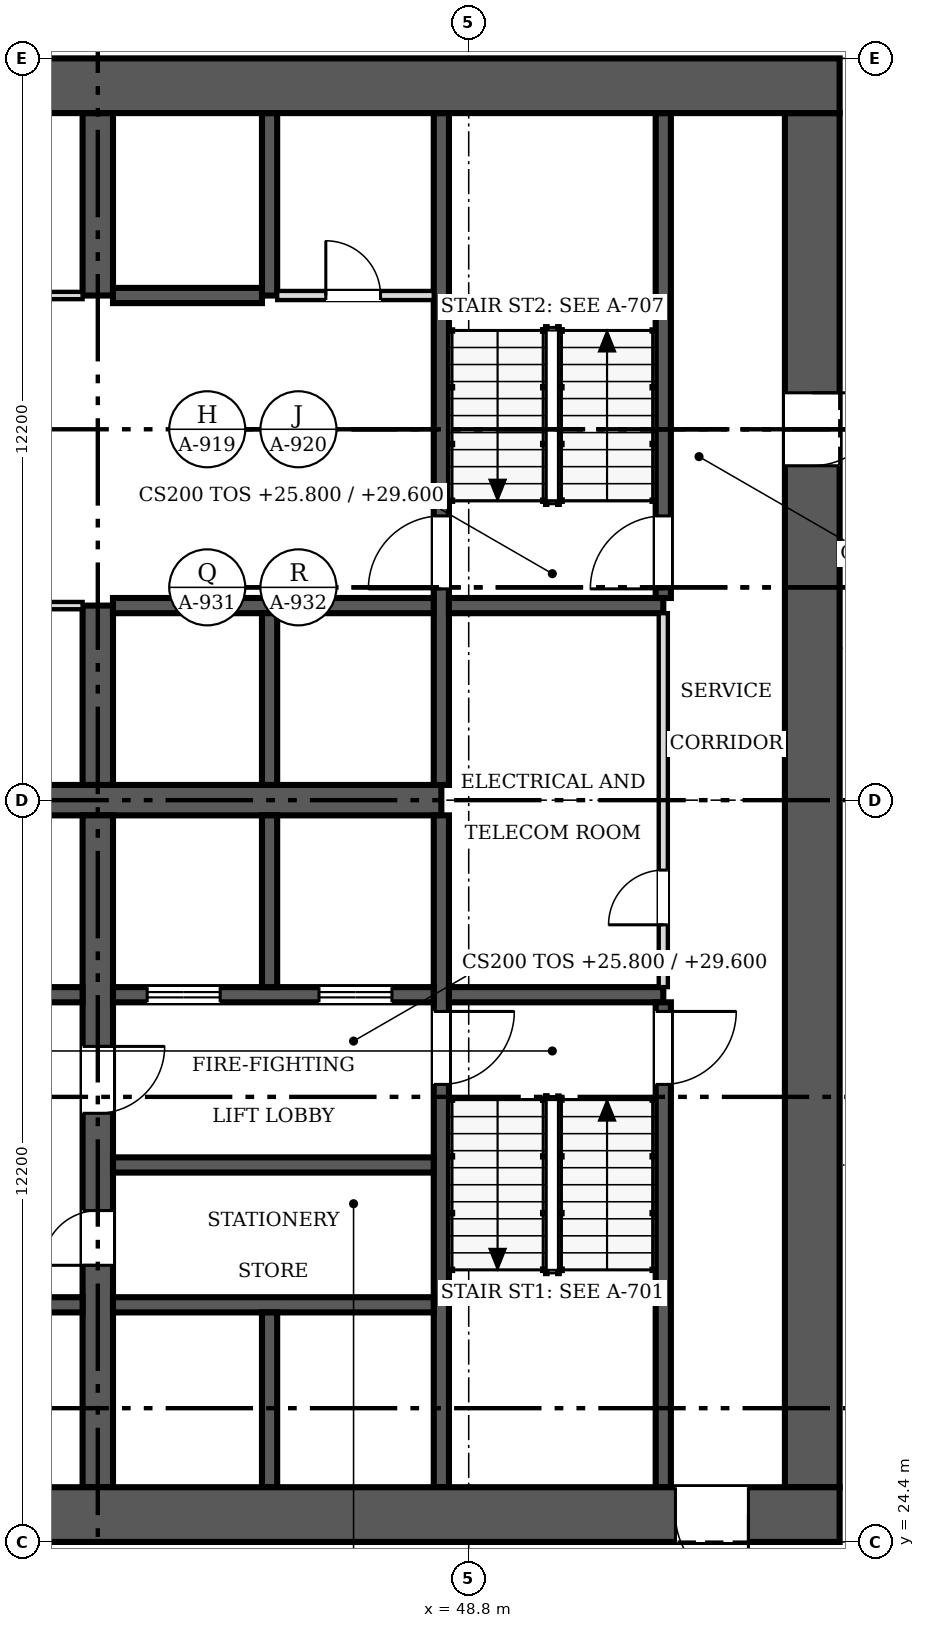
"""IFC4 building model, lengths in metres.
Left out: names, types, materials, properties, quantities, classifications, styles, units other than length and angle.
Written with IfcOpenShell. Run it as: python <this file> out.ifc"""

import sys

from ifc_helpers import new_model, si_unit, direction, frame, frame_2d, origin, place, context, subcontext, project, spatial, rectangle, extrude, source, transform, mapped, element, fill, save


model = new_model("IFC4")
c1 = context("Model", 3, precision=1e-05, world=origin(), true_north=direction((0.0, 1.0)))
c2 = subcontext(c1, "Body", "Model", "MODEL_VIEW")
j1 = project(units=[si_unit("LENGTHUNIT", "METRE"), si_unit("PLANEANGLEUNIT", "RADIAN")], contexts=[c1])
p1 = place(None, origin())
s1 = spatial("IfcSite", under=j1, at=p1, CompositionType="ELEMENT")
p2 = place(p1, origin())
s2 = spatial("IfcBuilding", under=s1, at=p2, CompositionType="ELEMENT")
p3 = place(p2, frame((0.0, 0.0, 25.8)))
s3 = spatial("IfcBuildingStorey", under=s2, at=p3, CompositionType="ELEMENT", Elevation=25.8)
p4 = place(p3, frame((54.9, 24.85, 0.0), z_axis=(0.0, 0.0, 1.0), x_axis=(-1.0, 0.0, 0.0)))
e1 = element("IfcWall", 1, at=p4, inside=s3, PredefinedType="SHEAR", context=c2, shape_type="SweptSolid", body=[
    extrude(rectangle(XDim=24.4, YDim=0.9, at=frame_2d((12.2, 0.0))), origin(), (0.0, 0.0, 1.0), 3.8),
])
m1 = source(origin(), c2, "Body", "SweptSolid", [
    extrude(rectangle(XDim=1.2, YDim=2.1, at=frame_2d((0.6, 1.05))), frame((0.0, 0.46, 0.0), z_axis=(0.0, -1.0, 0.0), x_axis=(1.0, 0.0, 0.0)), (0.0, 0.0, 1.0), 0.92),
])
p5 = place(p4, frame((1.5, 0.0, 0.0)))
e2 = element("IfcOpeningElement", 2, at=p5, cuts=e1, PredefinedType="OPENING", context=c2, shape_type="MappedRepresentation", body=[
    mapped(m1, transform((0.0, 0.0, 0.0), scale=1.0)),
])
p6 = place(p3, frame((30.5, 48.35, 0.0), z_axis=(0.0, 0.0, 1.0), x_axis=(1.0, 0.0, 0.0)))
e3 = element("IfcWall", 3, at=p6, inside=s3, PredefinedType="SHEAR", context=c2, shape_type="SweptSolid", body=[
    extrude(rectangle(XDim=24.4, YDim=0.9, at=frame_2d((12.2, 0.0))), origin(), (0.0, 0.0, 1.0), 3.8),
])
p7 = place(p3, frame((54.45, 47.9, 0.0), z_axis=(0.0, 0.0, 1.0), x_axis=(0.0, -1.0, 0.0)))
e4 = element("IfcWall", 4, at=p7, inside=s3, PredefinedType="SHEAR", context=c2, shape_type="SweptSolid", body=[
    extrude(rectangle(XDim=22.6, YDim=0.9, at=frame_2d((11.3, 0.0))), origin(), (0.0, 0.0, 1.0), 3.8),
])
p8 = place(p7, frame((4.6, 0.0, 0.0)))
e5 = element("IfcOpeningElement", 5, at=p8, cuts=e4, PredefinedType="OPENING", context=c2, shape_type="MappedRepresentation", body=[
    mapped(m1, transform((0.0, 0.0, 0.0), scale=1.0)),
])
p9 = place(p3, frame((31.4, 36.6, 0.0), z_axis=(0.0, 0.0, 1.0), x_axis=(1.0, 0.0, 0.0)))
e6 = element("IfcWall", 6, at=p9, inside=s3, PredefinedType="SHEAR", context=c2, shape_type="SweptSolid", body=[
    extrude(rectangle(XDim=16.95, YDim=0.5, at=frame_2d((8.475, 0.0))), origin(), (0.0, 0.0, 1.0), 3.8),
])
p10 = place(p3, frame((42.7, 36.35, 0.0), z_axis=(0.0, 0.0, 1.0), x_axis=(0.0, -1.0, 0.0)))
e7 = element("IfcWall", 7, at=p10, inside=s3, PredefinedType="SHEAR", context=c2, shape_type="SweptSolid", body=[
    extrude(rectangle(XDim=11.05, YDim=0.5, at=frame_2d((5.525, 0.0))), origin(), (0.0, 0.0, 1.0), 3.8),
])
m2 = source(origin(), c2, "Body", "SweptSolid", [
    extrude(rectangle(XDim=0.9, YDim=2.1, at=frame_2d((0.45, 1.05))), frame((0.0, 0.26, 0.0), z_axis=(0.0, -1.0, 0.0), x_axis=(1.0, 0.0, 0.0)), (0.0, 0.0, 1.0), 0.52),
])
p11 = place(p10, frame((6.5, 0.0, 0.0)))
e8 = element("IfcOpeningElement", 8, at=p11, cuts=e7, PredefinedType="OPENING", context=c2, shape_type="MappedRepresentation", body=[
    mapped(m2, transform((0.0, 0.0, 0.0), scale=1.0)),
])
m3 = source(origin(), c2, "Body", "SweptSolid", [
    extrude(rectangle(XDim=1.1, YDim=2.1, at=frame_2d((0.55, 1.05))), frame((0.0, 0.26, 0.0), z_axis=(0.0, -1.0, 0.0), x_axis=(1.0, 0.0, 0.0)), (0.0, 0.0, 1.0), 0.52),
])
p12 = place(p10, frame((3.8, 0.0, 0.0)))
e9 = element("IfcOpeningElement", 9, at=p12, cuts=e7, PredefinedType="OPENING", context=c2, shape_type="MappedRepresentation", body=[
    mapped(m3, transform((0.0, 0.0, 0.0), scale=1.0)),
])
p13 = place(p3, frame((42.7, 36.85, 0.0), z_axis=(0.0, 0.0, 1.0), x_axis=(0.0, 1.0, 0.0)))
e10 = element("IfcWall", 10, at=p13, inside=s3, PredefinedType="SHEAR", context=c2, shape_type="SweptSolid", body=[
    extrude(rectangle(XDim=2.95, YDim=0.5, at=frame_2d((1.475, 0.0))), origin(), (0.0, 0.0, 1.0), 3.8),
])
p14 = place(p3, frame((42.7, 44.9, 0.0), z_axis=(0.0, 0.0, 1.0), x_axis=(0.0, 1.0, 0.0)))
e11 = element("IfcWall", 11, at=p14, inside=s3, PredefinedType="SHEAR", context=c2, shape_type="SweptSolid", body=[
    extrude(rectangle(XDim=3.0, YDim=0.5, at=frame_2d((1.5, 0.0))), origin(), (0.0, 0.0, 1.0), 3.8),
])
p15 = place(p3, frame((48.35, 36.35, 0.0), z_axis=(0.0, 0.0, 1.0), x_axis=(0.0, -1.0, 0.0)))
e12 = element("IfcWall", 12, at=p15, inside=s3, PredefinedType="SOLIDWALL", context=c2, shape_type="SweptSolid", body=[
    extrude(rectangle(XDim=11.05, YDim=0.25, at=frame_2d((5.525, 0.0))), origin(), (0.0, 0.0, 1.0), 3.8),
])
m4 = source(origin(), c2, "Body", "SweptSolid", [
    extrude(rectangle(XDim=1.2, YDim=2.1, at=frame_2d((0.6, 1.05))), frame((0.0, 0.135, 0.0), z_axis=(0.0, -1.0, 0.0), x_axis=(1.0, 0.0, 0.0)), (0.0, 0.0, 1.0), 0.27),
])
p16 = place(p15, frame((3.225, 0.0, 0.0)))
e13 = element("IfcOpeningElement", 13, at=p16, cuts=e12, PredefinedType="OPENING", context=c2, shape_type="MappedRepresentation", body=[
    mapped(m4, transform((0.0, 0.0, 0.0), scale=1.0)),
])
p17 = place(p3, frame((48.35, 47.9, 0.0), z_axis=(0.0, 0.0, 1.0), x_axis=(0.0, -1.0, 0.0)))
e14 = element("IfcWall", 14, at=p17, inside=s3, PredefinedType="SOLIDWALL", context=c2, shape_type="SweptSolid", body=[
    extrude(rectangle(XDim=11.05, YDim=0.25, at=frame_2d((5.525, 0.0))), origin(), (0.0, 0.0, 1.0), 3.8),
])
p18 = place(p17, frame((6.625, 0.0, 0.0)))
e15 = element("IfcOpeningElement", 15, at=p18, cuts=e14, PredefinedType="OPENING", context=c2, shape_type="MappedRepresentation", body=[
    mapped(m4, transform((0.0, 0.0, 0.0), scale=1.0)),
])
p19 = place(p3, frame((42.45, 33.4, 0.0), z_axis=(0.0, 0.0, 1.0), x_axis=(-1.0, 0.0, 0.0)))
e16 = element("IfcWall", 16, at=p19, inside=s3, PredefinedType="SOLIDWALL", context=c2, shape_type="SweptSolid", body=[
    extrude(rectangle(XDim=11.05, YDim=0.25, at=frame_2d((5.525, 0.0))), origin(), (0.0, 0.0, 1.0), 3.8),
])
m5 = source(origin(), c2, "Body", "SweptSolid", [
    extrude(rectangle(XDim=1.1, YDim=2.1, at=frame_2d((0.55, 1.05))), frame((0.0, 0.135, 0.0), z_axis=(0.0, -1.0, 0.0), x_axis=(1.0, 0.0, 0.0)), (0.0, 0.0, 1.0), 0.27),
])
p20 = place(p19, frame((9.087, 0.0, 0.0)))
e17 = element("IfcOpeningElement", 17, at=p20, cuts=e16, PredefinedType="OPENING", context=c2, shape_type="MappedRepresentation", body=[
    mapped(m5, transform((0.0, 0.0, 0.0), scale=1.0)),
])
p21 = place(p19, frame((6.262, 0.0, 0.0)))
e18 = element("IfcOpeningElement", 18, at=p21, cuts=e16, PredefinedType="OPENING", context=c2, shape_type="MappedRepresentation", body=[
    mapped(m5, transform((0.0, 0.0, 0.0), scale=1.0)),
])
p22 = place(p19, frame((3.438, 0.0, 0.0)))
e19 = element("IfcOpeningElement", 19, at=p22, cuts=e16, PredefinedType="OPENING", context=c2, shape_type="MappedRepresentation", body=[
    mapped(m5, transform((0.0, 0.0, 0.0), scale=1.0)),
])
p23 = place(p19, frame((0.613, 0.0, 0.0)))
e20 = element("IfcOpeningElement", 20, at=p23, cuts=e16, PredefinedType="OPENING", context=c2, shape_type="MappedRepresentation", body=[
    mapped(m5, transform((0.0, 0.0, 0.0), scale=1.0)),
])
p24 = place(p3, frame((48.225, 33.4, 0.0), z_axis=(0.0, 0.0, 1.0), x_axis=(-1.0, 0.0, 0.0)))
e21 = element("IfcWall", 21, at=p24, inside=s3, PredefinedType="SOLIDWALL", context=c2, shape_type="SweptSolid", body=[
    extrude(rectangle(XDim=5.275, YDim=0.25, at=frame_2d((2.638, 0.0))), origin(), (0.0, 0.0, 1.0), 3.8),
])
p25 = place(p24, frame((3.512, 0.0, 0.0)))
e22 = element("IfcOpeningElement", 22, at=p25, cuts=e21, PredefinedType="OPENING", context=c2, shape_type="MappedRepresentation", body=[
    mapped(m4, transform((0.0, 0.0, 0.0), scale=1.0)),
])
p26 = place(p24, frame((0.688, 0.0, 0.0)))
e23 = element("IfcOpeningElement", 23, at=p26, cuts=e21, PredefinedType="OPENING", context=c2, shape_type="MappedRepresentation", body=[
    mapped(m4, transform((0.0, 0.0, 0.0), scale=1.0)),
])
p27 = place(p3, frame((48.475, 33.4, 0.0), z_axis=(0.0, 0.0, 1.0), x_axis=(1.0, 0.0, 0.0)))
e24 = element("IfcWall", 24, at=p27, inside=s3, PredefinedType="SOLIDWALL", context=c2, shape_type="SweptSolid", body=[
    extrude(rectangle(XDim=3.525, YDim=0.25, at=frame_2d((1.762, 0.0))), origin(), (0.0, 0.0, 1.0), 3.8),
])
p28 = place(p3, frame((31.4, 28.3, 0.0), z_axis=(0.0, 0.0, 1.0), x_axis=(1.0, 0.0, 0.0)))
e25 = element("IfcWall", 25, at=p28, inside=s3, PredefinedType="SOLIDWALL", context=c2, shape_type="SweptSolid", body=[
    extrude(rectangle(XDim=11.05, YDim=0.25, at=frame_2d((5.525, 0.0))), origin(), (0.0, 0.0, 1.0), 3.8),
])
p29 = place(p28, frame((0.863, 0.0, 0.0)))
e26 = element("IfcOpeningElement", 26, at=p29, cuts=e25, PredefinedType="OPENING", context=c2, shape_type="MappedRepresentation", body=[
    mapped(m5, transform((0.0, 0.0, 0.0), scale=1.0)),
])
p30 = place(p28, frame((3.688, 0.0, 0.0)))
e27 = element("IfcOpeningElement", 27, at=p30, cuts=e25, PredefinedType="OPENING", context=c2, shape_type="MappedRepresentation", body=[
    mapped(m5, transform((0.0, 0.0, 0.0), scale=1.0)),
])
p31 = place(p28, frame((6.512, 0.0, 0.0)))
e28 = element("IfcOpeningElement", 28, at=p31, cuts=e25, PredefinedType="OPENING", context=c2, shape_type="MappedRepresentation", body=[
    mapped(m5, transform((0.0, 0.0, 0.0), scale=1.0)),
])
p32 = place(p28, frame((9.337, 0.0, 0.0)))
e29 = element("IfcOpeningElement", 29, at=p32, cuts=e25, PredefinedType="OPENING", context=c2, shape_type="MappedRepresentation", body=[
    mapped(m5, transform((0.0, 0.0, 0.0), scale=1.0)),
])
for number, where, z_axis, x_axis in (
    (30, (42.95, 28.3, 0.0), (0.0, 0.0, 1.0), (1.0, 0.0, 0.0)),
    (31, (42.95, 39.8, 0.0), (0.0, 0.0, 1.0), (1.0, 0.0, 0.0)),
):
    element("IfcWall", number, at=place(p3, frame(where, z_axis=z_axis, x_axis=x_axis)), inside=s3, PredefinedType="SOLIDWALL", context=c2, shape_type="SweptSolid", body=[
        extrude(rectangle(XDim=5.275, YDim=0.25, at=frame_2d((2.638, 0.0))), origin(), (0.0, 0.0, 1.0), 3.8),
    ])
p33 = place(p3, frame((48.475, 39.8, 0.0), z_axis=(0.0, 0.0, 1.0), x_axis=(1.0, 0.0, 0.0)))
e32 = element("IfcWall", 32, at=p33, inside=s3, PredefinedType="SOLIDWALL", context=c2, shape_type="SweptSolid", body=[
    extrude(rectangle(XDim=3.525, YDim=0.25, at=frame_2d((1.762, 0.0))), origin(), (0.0, 0.0, 1.0), 3.8),
])
p34 = place(p3, frame((52.0, 25.3, 0.0), z_axis=(0.0, 0.0, 1.0), x_axis=(0.0, 1.0, 0.0)))
e33 = element("IfcWall", 33, at=p34, inside=s3, PredefinedType="SOLIDWALL", context=c2, shape_type="SweptSolid", body=[
    extrude(rectangle(XDim=7.975, YDim=0.25, at=frame_2d((3.987, 0.0))), origin(), (0.0, 0.0, 1.0), 3.8),
])
p35 = place(p34, frame((6.625, 0.0, 0.0)))
e34 = element("IfcOpeningElement", 34, at=p35, cuts=e33, PredefinedType="OPENING", context=c2, shape_type="MappedRepresentation", body=[
    mapped(m4, transform((0.0, 0.0, 0.0), scale=1.0)),
])
p36 = place(p3, frame((52.0, 39.925, 0.0), z_axis=(0.0, 0.0, 1.0), x_axis=(0.0, 1.0, 0.0)))
e35 = element("IfcWall", 35, at=p36, inside=s3, PredefinedType="SOLIDWALL", context=c2, shape_type="SweptSolid", body=[
    extrude(rectangle(XDim=7.975, YDim=0.25, at=frame_2d((3.987, 0.0))), origin(), (0.0, 0.0, 1.0), 3.8),
])
p37 = place(p36, frame((0.15, 0.0, 0.0)))
e36 = element("IfcOpeningElement", 36, at=p37, cuts=e35, PredefinedType="OPENING", context=c2, shape_type="MappedRepresentation", body=[
    mapped(m4, transform((0.0, 0.0, 0.0), scale=1.0)),
])
p38 = place(p3, frame((45.525, 33.525, 0.0), z_axis=(0.0, 0.0, 1.0), x_axis=(0.0, 1.0, 0.0)))
e37 = element("IfcWall", 37, at=p38, inside=s3, PredefinedType="SOLIDWALL", context=c2, shape_type="SweptSolid", body=[
    extrude(rectangle(XDim=2.825, YDim=0.25, at=frame_2d((1.413, 0.0))), origin(), (0.0, 0.0, 1.0), 3.8),
])
p39 = place(p3, frame((45.525, 36.85, 0.0), z_axis=(0.0, 0.0, 1.0), x_axis=(0.0, 1.0, 0.0)))
e38 = element("IfcWall", 38, at=p39, inside=s3, PredefinedType="SOLIDWALL", context=c2, shape_type="SweptSolid", body=[
    extrude(rectangle(XDim=2.825, YDim=0.25, at=frame_2d((1.413, 0.0))), origin(), (0.0, 0.0, 1.0), 3.8),
])
p40 = place(p3, frame((42.95, 30.6, 0.0), z_axis=(0.0, 0.0, 1.0), x_axis=(1.0, 0.0, 0.0)))
e39 = element("IfcWall", 39, at=p40, inside=s3, PredefinedType="SOLIDWALL", context=c2, shape_type="SweptSolid", body=[
    extrude(rectangle(XDim=5.275, YDim=0.25, at=frame_2d((2.638, 0.0))), origin(), (0.0, 0.0, 1.0), 3.8),
])
p41 = place(p3, frame((45.525, 25.3, 0.0), z_axis=(0.0, 0.0, 1.0), x_axis=(0.0, 1.0, 0.0)))
e40 = element("IfcWall", 40, at=p41, inside=s3, PredefinedType="SOLIDWALL", context=c2, shape_type="SweptSolid", body=[
    extrude(rectangle(XDim=2.875, YDim=0.25, at=frame_2d((1.438, 0.0))), origin(), (0.0, 0.0, 1.0), 3.8),
])
p42 = place(p3, frame((45.525, 44.9, 0.0), z_axis=(0.0, 0.0, 1.0), x_axis=(0.0, 1.0, 0.0)))
e41 = element("IfcWall", 41, at=p42, inside=s3, PredefinedType="SOLIDWALL", context=c2, shape_type="SweptSolid", body=[
    extrude(rectangle(XDim=3.0, YDim=0.25, at=frame_2d((1.5, 0.0))), origin(), (0.0, 0.0, 1.0), 3.8),
])
p43 = place(p3, frame((42.95, 44.9, 0.0), z_axis=(0.0, 0.0, 1.0), x_axis=(1.0, 0.0, 0.0)))
e42 = element("IfcWall", 42, at=p43, inside=s3, PredefinedType="SOLIDWALL", context=c2, shape_type="SweptSolid", body=[
    extrude(rectangle(XDim=2.45, YDim=0.25, at=frame_2d((1.225, 0.0))), origin(), (0.0, 0.0, 1.0), 3.8),
])
p44 = place(p3, frame((31.4, 44.9, 0.0), z_axis=(0.0, 0.0, 1.0), x_axis=(1.0, 0.0, 0.0)))
e43 = element("IfcWall", 43, at=p44, inside=s3, PredefinedType="PARTITIONING", context=c2, shape_type="SweptSolid", body=[
    extrude(rectangle(XDim=11.05, YDim=0.12, at=frame_2d((5.525, 0.0))), origin(), (0.0, 0.0, 1.0), 3.6),
])
m6 = source(origin(), c2, "Body", "SweptSolid", [
    extrude(rectangle(XDim=0.9, YDim=2.1, at=frame_2d((0.45, 1.05))), frame((0.0, 0.07, 0.0), z_axis=(0.0, -1.0, 0.0), x_axis=(1.0, 0.0, 0.0)), (0.0, 0.0, 1.0), 0.14),
])
p45 = place(p44, frame((3.788, 0.0, 0.0)))
e44 = element("IfcOpeningElement", 44, at=p45, cuts=e43, PredefinedType="OPENING", context=c2, shape_type="MappedRepresentation", body=[
    mapped(m6, transform((0.0, 0.0, 0.0), scale=1.0)),
])
p46 = place(p44, frame((9.438, 0.0, 0.0)))
e45 = element("IfcOpeningElement", 45, at=p46, cuts=e43, PredefinedType="OPENING", context=c2, shape_type="MappedRepresentation", body=[
    mapped(m6, transform((0.0, 0.0, 0.0), scale=1.0)),
])
p47 = place(p3, frame((42.45, 39.8, 0.0), z_axis=(0.0, 0.0, 1.0), x_axis=(-1.0, 0.0, 0.0)))
e46 = element("IfcWall", 46, at=p47, inside=s3, PredefinedType="PARTITIONING", context=c2, shape_type="SweptSolid", body=[
    extrude(rectangle(XDim=8.225, YDim=0.12, at=frame_2d((4.112, 0.0))), origin(), (0.0, 0.0, 1.0), 3.6),
])
p48 = place(p47, frame((3.538, 0.0, 0.0)))
e47 = element("IfcOpeningElement", 47, at=p48, cuts=e46, PredefinedType="OPENING", context=c2, shape_type="MappedRepresentation", body=[
    mapped(m6, transform((0.0, 0.0, 0.0), scale=1.0)),
])
p49 = place(p3, frame((52.0, 33.525, 0.0), z_axis=(0.0, 0.0, 1.0), x_axis=(0.0, 1.0, 0.0)))
e48 = element("IfcWall", 48, at=p49, inside=s3, PredefinedType="PARTITIONING", context=c2, shape_type="SweptSolid", body=[
    extrude(rectangle(XDim=6.15, YDim=0.15, at=frame_2d((3.075, 0.0))), origin(), (0.0, 0.0, 1.0), 3.6),
])
m7 = source(origin(), c2, "Body", "SweptSolid", [
    extrude(rectangle(XDim=0.9, YDim=2.1, at=frame_2d((0.45, 1.05))), frame((0.0, 0.085, 0.0), z_axis=(0.0, -1.0, 0.0), x_axis=(1.0, 0.0, 0.0)), (0.0, 0.0, 1.0), 0.17),
])
p50 = place(p49, frame((1.025, 0.0, 0.0)))
e49 = element("IfcOpeningElement", 49, at=p50, cuts=e48, PredefinedType="OPENING", context=c2, shape_type="MappedRepresentation", body=[
    mapped(m7, transform((0.0, 0.0, 0.0), scale=1.0)),
])
p51 = place(p3, frame((45.65, 44.9, 0.0), z_axis=(0.0, 0.0, 1.0), x_axis=(1.0, 0.0, 0.0)))
e50 = element("IfcWall", 50, at=p51, inside=s3, PredefinedType="PARTITIONING", context=c2, shape_type="SweptSolid", body=[
    extrude(rectangle(XDim=2.575, YDim=0.15, at=frame_2d((1.288, 0.0))), origin(), (0.0, 0.0, 1.0), 3.6),
])
p52 = place(p51, frame((0.8, 0.0, 0.0)))
e51 = element("IfcOpeningElement", 51, at=p52, cuts=e50, PredefinedType="OPENING", context=c2, shape_type="MappedRepresentation", body=[
    mapped(m7, transform((0.0, 0.0, 0.0), scale=1.0)),
])
m8 = source(origin(), c2, "Body", "SweptSolid", [
    extrude(rectangle(XDim=1.2, YDim=2.1, at=frame_2d((0.6, 1.05))), frame((0.0, 0.025, 0.0), z_axis=(0.0, -1.0, 0.0), x_axis=(1.0, 0.0, 0.0)), (0.0, 0.0, 1.0), 0.05),
])
p53 = place(p5, origin())
e52 = element("IfcDoor", 52, at=p53, inside=s3, OperationType="SINGLE_SWING_LEFT", PredefinedType="DOOR", context=c2, shape_type="MappedRepresentation", body=[
    mapped(m8, transform((0.0, 0.0, 0.0), scale=1.0)),
])
fill(e2, e52)
p54 = place(p8, origin())
e53 = element("IfcDoor", 53, at=p54, inside=s3, OperationType="SINGLE_SWING_LEFT", PredefinedType="DOOR", context=c2, shape_type="MappedRepresentation", body=[
    mapped(m8, transform((0.0, 0.0, 0.0), scale=1.0)),
])
fill(e5, e53)
m9 = source(origin(), c2, "Body", "SweptSolid", [
    extrude(rectangle(XDim=0.9, YDim=2.1, at=frame_2d((0.45, 1.05))), frame((0.0, 0.025, 0.0), z_axis=(0.0, -1.0, 0.0), x_axis=(1.0, 0.0, 0.0)), (0.0, 0.0, 1.0), 0.05),
])
p55 = place(p11, origin())
e54 = element("IfcDoor", 54, at=p55, inside=s3, OperationType="SINGLE_SWING_RIGHT", PredefinedType="DOOR", context=c2, shape_type="MappedRepresentation", body=[
    mapped(m9, transform((0.0, 0.0, 0.0), scale=1.0)),
])
fill(e8, e54)
m10 = source(origin(), c2, "Body", "SweptSolid", [
    extrude(rectangle(XDim=1.1, YDim=2.1, at=frame_2d((0.55, 1.05))), frame((0.0, 0.025, 0.0), z_axis=(0.0, -1.0, 0.0), x_axis=(1.0, 0.0, 0.0)), (0.0, 0.0, 1.0), 0.05),
])
p56 = place(p12, origin())
e55 = element("IfcDoor", 55, at=p56, inside=s3, OperationType="SINGLE_SWING_LEFT", PredefinedType="DOOR", context=c2, shape_type="MappedRepresentation", body=[
    mapped(m10, transform((0.0, 0.0, 0.0), scale=1.0)),
])
fill(e9, e55)
p57 = place(p16, origin())
e56 = element("IfcDoor", 56, at=p57, inside=s3, OperationType="SINGLE_SWING_LEFT", PredefinedType="DOOR", context=c2, shape_type="MappedRepresentation", body=[
    mapped(m8, transform((0.0, 0.0, 0.0), scale=1.0)),
])
fill(e13, e56)
p58 = place(p18, origin())
e57 = element("IfcDoor", 57, at=p58, inside=s3, OperationType="SINGLE_SWING_RIGHT", PredefinedType="DOOR", context=c2, shape_type="MappedRepresentation", body=[
    mapped(m8, transform((0.0, 0.0, 0.0), scale=1.0)),
])
fill(e15, e57)
p59 = place(p25, origin())
e58 = element("IfcDoor", 58, at=p59, inside=s3, OperationType="DOUBLE_DOOR_SLIDING", PredefinedType="DOOR", context=c2, shape_type="MappedRepresentation", body=[
    mapped(m8, transform((0.0, 0.0, 0.0), scale=1.0)),
])
fill(e22, e58)
p60 = place(p26, origin())
e59 = element("IfcDoor", 59, at=p60, inside=s3, OperationType="DOUBLE_DOOR_SLIDING", PredefinedType="DOOR", context=c2, shape_type="MappedRepresentation", body=[
    mapped(m8, transform((0.0, 0.0, 0.0), scale=1.0)),
])
fill(e23, e59)
p61 = place(p35, origin())
e60 = element("IfcDoor", 60, at=p61, inside=s3, OperationType="SINGLE_SWING_RIGHT", PredefinedType="DOOR", context=c2, shape_type="MappedRepresentation", body=[
    mapped(m8, transform((0.0, 0.0, 0.0), scale=1.0)),
])
fill(e34, e60)
p62 = place(p37, origin())
e61 = element("IfcDoor", 61, at=p62, inside=s3, OperationType="SINGLE_SWING_LEFT", PredefinedType="DOOR", context=c2, shape_type="MappedRepresentation", body=[
    mapped(m8, transform((0.0, 0.0, 0.0), scale=1.0)),
])
fill(e36, e61)
p63 = place(p50, origin())
e62 = element("IfcDoor", 62, at=p63, inside=s3, OperationType="SINGLE_SWING_LEFT", PredefinedType="DOOR", context=c2, shape_type="MappedRepresentation", body=[
    mapped(m9, transform((0.0, 0.0, 0.0), scale=1.0)),
])
fill(e49, e62)
p64 = place(p52, origin())
e63 = element("IfcDoor", 63, at=p64, inside=s3, OperationType="SINGLE_SWING_LEFT", PredefinedType="DOOR", context=c2, shape_type="MappedRepresentation", body=[
    mapped(m9, transform((0.0, 0.0, 0.0), scale=1.0)),
])
fill(e51, e63)
save(model, sys.argv[1])
